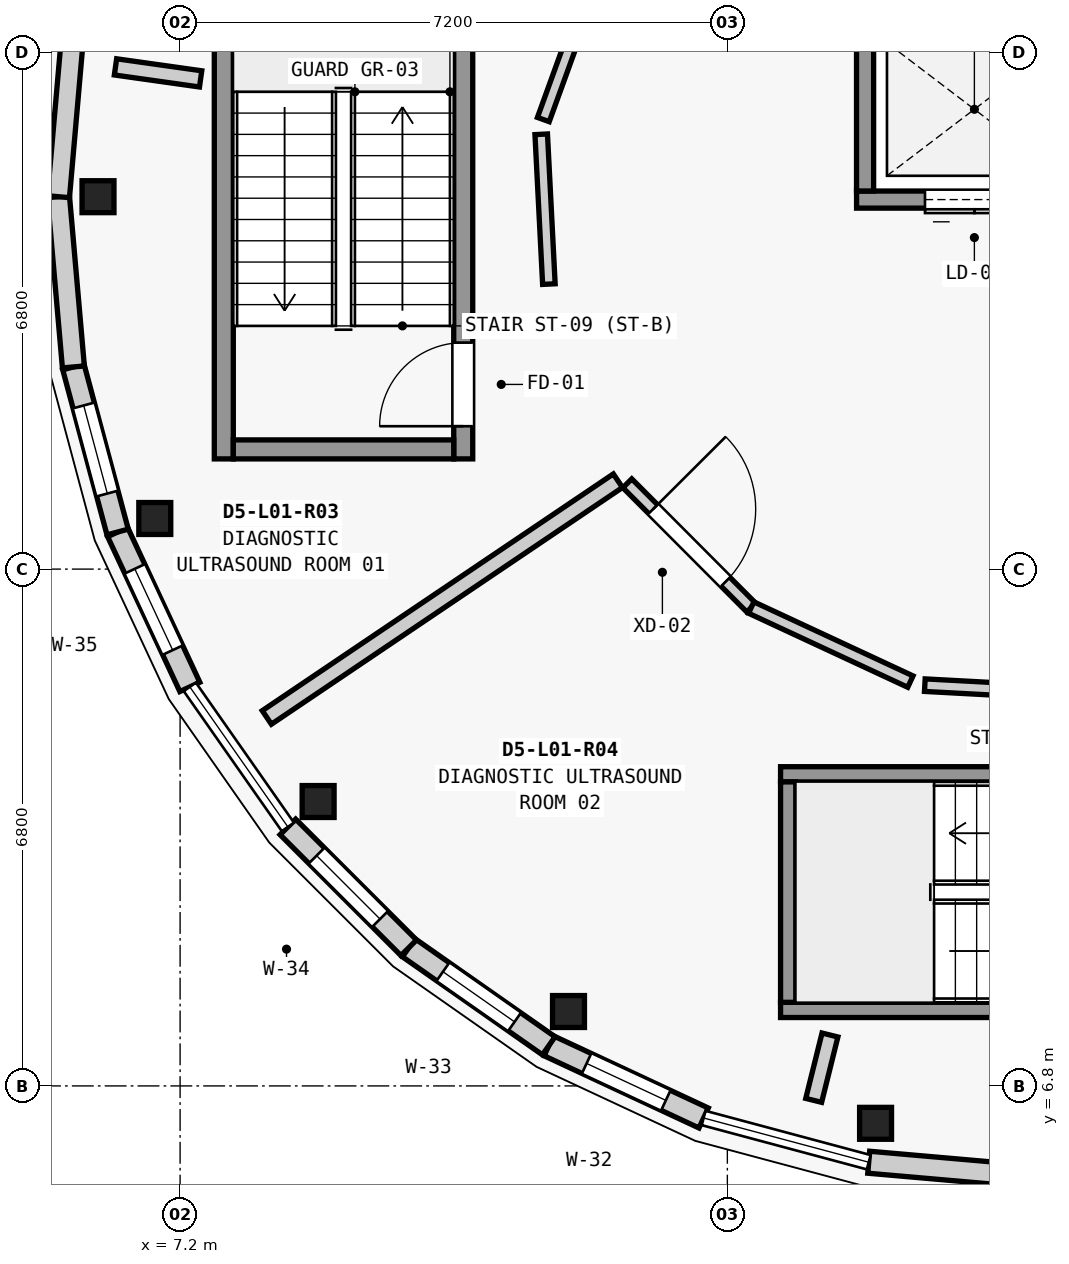
"""IFC4 building model, lengths in metres.
Left out: names, types, materials, properties, quantities, classifications, styles, units other than length and angle.
Written with IfcOpenShell. Run it as: python <this file> out.ifc"""

import sys

from ifc_helpers import new_model, si_unit, direction, frame, frame_2d, origin, origin_2d, place, context, subcontext, project, spatial, rectangle, extrude, element, fill, save


model = new_model("IFC4")
c1 = context("Model", 3, precision=1e-05, world=origin(), true_north=direction((0.0, 1.0)))
c2 = subcontext(c1, "Body", "Model", "MODEL_VIEW")
j1 = project(units=[si_unit("LENGTHUNIT", "METRE"), si_unit("PLANEANGLEUNIT", "RADIAN")], contexts=[c1])
p1 = place(None, origin())
s1 = spatial("IfcSite", under=j1, at=p1, CompositionType="ELEMENT")
p2 = place(p1, origin())
s2 = spatial("IfcBuilding", under=s1, at=p2, CompositionType="ELEMENT")
p3 = place(p2, frame((0.0, 0.0, 4.55)))
s3 = spatial("IfcBuildingStorey", under=s2, at=p3, CompositionType="ELEMENT", Elevation=4.55)
for number, where, z_axis, x_axis in (
    (1, (6.12, 18.5, 0.0), (0.0, 0.0, 1.0), (1.0, 0.0, 0.0)),
    (2, (6.867, 14.266, 0.0), (0.0, 0.0, 1.0), (1.0, 0.0, 0.0)),
    (3, (9.016, 10.542, 0.0), (0.0, 0.0, 1.0), (1.0, 0.0, 0.0)),
    (4, (12.31, 7.779, 0.0), (0.0, 0.0, 1.0), (1.0, 0.0, 0.0)),
    (5, (16.35, 6.308, 0.0), (0.0, 0.0, 1.0), (1.0, 0.0, 0.0)),
):
    element("IfcColumn", number, at=place(p3, frame(where, z_axis=z_axis, x_axis=x_axis)), inside=s3, PredefinedType="COLUMN", context=c2, shape_type="SweptSolid", body=[
        extrude(rectangle(XDim=0.42, YDim=0.42, at=origin_2d()), origin(), (0.0, 0.0, 1.0), 4.2),
    ])
p4 = place(p3, frame((18.5, 5.6, 0.0), z_axis=(0.0, 0.0, 1.0), x_axis=(-0.996201374201, 0.087079400775, 0.0)))
e6 = element("IfcWall", 6, at=p4, inside=s3, PredefinedType="ELEMENTEDWALL", context=c2, shape_type="SweptSolid", body=[
    extrude(rectangle(XDim=2.249, YDim=0.29, at=frame_2d((1.124, 0.0))), origin(), (0.0, 0.0, 1.0), 3.309),
])
p5 = place(p3, frame((14.088, 6.378, 0.0), z_axis=(0.0, 0.0, 1.0), x_axis=(-0.906360600886, 0.422504983593, 0.0)))
e7 = element("IfcWall", 7, at=p5, inside=s3, PredefinedType="ELEMENTEDWALL", context=c2, shape_type="SweptSolid", body=[
    extrude(rectangle(XDim=2.248, YDim=0.29, at=frame_2d((1.124, 0.0))), origin(), (0.0, 0.0, 1.0), 3.309),
])
p6 = place(p5, frame((0.549, 0.0, 0.85)))
e8 = element("IfcOpeningElement", 8, at=p6, cuts=e7, PredefinedType="OPENING", context=c2, shape_type="SweptSolid", body=[
    extrude(rectangle(XDim=1.15, YDim=2.0, at=frame_2d((0.575, 1.0))), frame((0.0, 0.155, 0.0), z_axis=(0.0, -1.0, 0.0), x_axis=(1.0, 0.0, 0.0)), (0.0, 0.0, 1.0), 0.31),
])
p7 = place(p3, frame((12.05, 7.328, 0.0), z_axis=(0.0, 0.0, 1.0), x_axis=(-0.819104393925, 0.573644482107, 0.0)))
e9 = element("IfcWall", 9, at=p7, inside=s3, PredefinedType="ELEMENTEDWALL", context=c2, shape_type="SweptSolid", body=[
    extrude(rectangle(XDim=2.249, YDim=0.29, at=frame_2d((1.125, 0.0))), origin(), (0.0, 0.0, 1.0), 3.309),
])
p8 = place(p7, frame((0.549, 0.0, 0.85)))
e10 = element("IfcOpeningElement", 10, at=p8, cuts=e9, PredefinedType="OPENING", context=c2, shape_type="SweptSolid", body=[
    extrude(rectangle(XDim=1.15, YDim=2.25, at=frame_2d((0.575, 1.125))), frame((0.0, 0.155, 0.0), z_axis=(0.0, -1.0, 0.0), x_axis=(1.0, 0.0, 0.0)), (0.0, 0.0, 1.0), 0.31),
])
p9 = place(p3, frame((10.208, 8.618, 0.0), z_axis=(0.0, 0.0, 1.0), x_axis=(-0.707106781187, 0.707106781187, 0.0)))
e11 = element("IfcWall", 11, at=p9, inside=s3, PredefinedType="ELEMENTEDWALL", context=c2, shape_type="SweptSolid", body=[
    extrude(rectangle(XDim=2.249, YDim=0.29, at=frame_2d((1.125, 0.0))), origin(), (0.0, 0.0, 1.0), 3.309),
])
p10 = place(p9, frame((0.534, 0.0, 0.85)))
e12 = element("IfcOpeningElement", 12, at=p10, cuts=e11, PredefinedType="OPENING", context=c2, shape_type="SweptSolid", body=[
    extrude(rectangle(XDim=1.18, YDim=1.55, at=frame_2d((0.59, 0.775))), frame((0.0, 0.155, 0.0), z_axis=(0.0, -1.0, 0.0), x_axis=(1.0, 0.0, 0.0)), (0.0, 0.0, 1.0), 0.31),
])
p11 = place(p3, frame((7.328, 12.05, 0.0), z_axis=(0.0, 0.0, 1.0), x_axis=(-0.422504983593, 0.906360600886, 0.0)))
e13 = element("IfcWall", 13, at=p11, inside=s3, PredefinedType="ELEMENTEDWALL", context=c2, shape_type="SweptSolid", body=[
    extrude(rectangle(XDim=2.248, YDim=0.29, at=frame_2d((1.124, 0.0))), origin(), (0.0, 0.0, 1.0), 3.309),
])
p12 = place(p11, frame((0.534, 0.0, 0.85)))
e14 = element("IfcOpeningElement", 14, at=p12, cuts=e13, PredefinedType="OPENING", context=c2, shape_type="SweptSolid", body=[
    extrude(rectangle(XDim=1.18, YDim=1.85, at=frame_2d((0.59, 0.925))), frame((0.0, 0.155, 0.0), z_axis=(0.0, -1.0, 0.0), x_axis=(1.0, 0.0, 0.0)), (0.0, 0.0, 1.0), 0.31),
])
p13 = place(p3, frame((6.378, 14.088, 0.0), z_axis=(0.0, 0.0, 1.0), x_axis=(-0.258824721145, 0.96592430538, 0.0)))
e15 = element("IfcWall", 15, at=p13, inside=s3, PredefinedType="ELEMENTEDWALL", context=c2, shape_type="SweptSolid", body=[
    extrude(rectangle(XDim=2.249, YDim=0.29, at=frame_2d((1.125, 0.0))), origin(), (0.0, 0.0, 1.0), 3.309),
])
p14 = place(p13, frame((0.524, 0.0, 0.85)))
e16 = element("IfcOpeningElement", 16, at=p14, cuts=e15, PredefinedType="OPENING", context=c2, shape_type="SweptSolid", body=[
    extrude(rectangle(XDim=1.2, YDim=1.35, at=frame_2d((0.6, 0.675))), frame((0.0, 0.155, 0.0), z_axis=(0.0, -1.0, 0.0), x_axis=(1.0, 0.0, 0.0)), (0.0, 0.0, 1.0), 0.31),
])
for number, where, z_axis, x_axis in (
    (17, (5.796, 16.26, 0.0), (0.0, 0.0, 1.0), (-0.087, 0.996, 0.0)),
    (18, (5.6, 18.5, 0.0), (0.0, 0.0, 1.0), (0.087, 0.996, 0.0)),
):
    element("IfcWall", number, at=place(p3, frame(where, z_axis=z_axis, x_axis=x_axis)), inside=s3, PredefinedType="ELEMENTEDWALL", context=c2, shape_type="SweptSolid", body=[
        extrude(rectangle(XDim=2.249, YDim=0.29, at=frame_2d((1.124, 0.0))), origin(), (0.0, 0.0, 1.0), 3.309),
    ])
p15 = place(p3, frame((10.925, 15.05, 0.0), z_axis=(0.0, 0.0, 1.0), x_axis=(0.0, 1.0, 0.0)))
e19 = element("IfcWall", 19, at=p15, inside=s3, PredefinedType="SHEAR", context=c2, shape_type="SweptSolid", body=[
    extrude(rectangle(XDim=6.9, YDim=0.25, at=frame_2d((3.45, 0.0))), origin(), (0.0, 0.0, 1.0), 3.955),
])
p16 = place(p15, frame((0.43, 0.0, 0.0)))
e20 = element("IfcOpeningElement", 20, at=p16, cuts=e19, PredefinedType="OPENING", context=c2, shape_type="SweptSolid", body=[
    extrude(rectangle(XDim=1.1, YDim=2.15, at=frame_2d((0.55, 1.075))), frame((0.0, 0.135, 0.0), z_axis=(0.0, -1.0, 0.0), x_axis=(1.0, 0.0, 0.0)), (0.0, 0.0, 1.0), 0.27),
])
p17 = place(p3, frame((7.775, 15.05, 0.0), z_axis=(0.0, 0.0, 1.0), x_axis=(0.0, 1.0, 0.0)))
e21 = element("IfcWall", 21, at=p17, inside=s3, PredefinedType="SHEAR", context=c2, shape_type="SweptSolid", body=[
    extrude(rectangle(XDim=6.9, YDim=0.25, at=frame_2d((3.45, 0.0))), origin(), (0.0, 0.0, 1.0), 3.955),
])
p18 = place(p3, frame((10.8, 15.175, 0.0), z_axis=(0.0, 0.0, 1.0), x_axis=(-1.0, 0.0, 0.0)))
e22 = element("IfcWall", 22, at=p18, inside=s3, PredefinedType="SHEAR", context=c2, shape_type="SweptSolid", body=[
    extrude(rectangle(XDim=2.9, YDim=0.25, at=frame_2d((1.45, 0.0))), origin(), (0.0, 0.0, 1.0), 3.955),
])
p19 = place(p3, frame((21.9, 10.9, 0.0), z_axis=(0.0, 0.0, 1.0), x_axis=(-1.0, 0.0, 0.0)))
e23 = element("IfcWall", 23, at=p19, inside=s3, PredefinedType="SHEAR", context=c2, shape_type="SweptSolid", body=[
    extrude(rectangle(XDim=6.8, YDim=0.2, at=frame_2d((3.4, 0.0))), origin(), (0.0, 0.0, 1.0), 3.955),
])
p20 = place(p19, frame((0.38, 0.0, 0.0)))
e24 = element("IfcOpeningElement", 24, at=p20, cuts=e23, PredefinedType="OPENING", context=c2, shape_type="SweptSolid", body=[
    extrude(rectangle(XDim=1.05, YDim=2.15, at=frame_2d((0.525, 1.075))), frame((0.0, 0.11, 0.0), z_axis=(0.0, -1.0, 0.0), x_axis=(1.0, 0.0, 0.0)), (0.0, 0.0, 1.0), 0.22),
])
p21 = place(p3, frame((21.9, 7.8, 0.0), z_axis=(0.0, 0.0, 1.0), x_axis=(-1.0, 0.0, 0.0)))
e25 = element("IfcWall", 25, at=p21, inside=s3, PredefinedType="SHEAR", context=c2, shape_type="SweptSolid", body=[
    extrude(rectangle(XDim=6.8, YDim=0.2, at=frame_2d((3.4, 0.0))), origin(), (0.0, 0.0, 1.0), 3.955),
])
p22 = place(p3, frame((15.2, 10.8, 0.0), z_axis=(0.0, 0.0, 1.0), x_axis=(0.0, -1.0, 0.0)))
e26 = element("IfcWall", 26, at=p22, inside=s3, PredefinedType="SHEAR", context=c2, shape_type="SweptSolid", body=[
    extrude(rectangle(XDim=2.9, YDim=0.2, at=frame_2d((1.45, 0.0))), origin(), (0.0, 0.0, 1.0), 3.955),
])
p23 = place(p3, frame((16.1, 18.462, 0.0), z_axis=(0.0, 0.0, 1.0), x_axis=(1.0, 0.0, 0.0)))
e27 = element("IfcWall", 27, at=p23, inside=s3, PredefinedType="SHEAR", context=c2, shape_type="SweptSolid", body=[
    extrude(rectangle(XDim=3.1, YDim=0.225, at=frame_2d((1.55, 0.0))), origin(), (0.0, 0.0, 1.0), 3.955),
])
p24 = place(p23, frame((0.9, 0.0, 0.0)))
e28 = element("IfcOpeningElement", 28, at=p24, cuts=e27, PredefinedType="OPENING", context=c2, shape_type="SweptSolid", body=[
    extrude(rectangle(XDim=1.3, YDim=2.2, at=frame_2d((0.65, 1.1))), frame((0.0, 0.123, 0.0), z_axis=(0.0, -1.0, 0.0), x_axis=(1.0, 0.0, 0.0)), (0.0, 0.0, 1.0), 0.245),
])
p25 = place(p3, frame((16.212, 18.575, 0.0), z_axis=(0.0, 0.0, 1.0), x_axis=(0.0, 1.0, 0.0)))
e29 = element("IfcWall", 29, at=p25, inside=s3, PredefinedType="SHEAR", context=c2, shape_type="SweptSolid", body=[
    extrude(rectangle(XDim=2.15, YDim=0.225, at=frame_2d((1.075, 0.0))), origin(), (0.0, 0.0, 1.0), 3.955),
])
p26 = place(p3, frame((7.47, 20.05, 0.0), z_axis=(0.0, 0.0, 1.0), x_axis=(-0.990198351661, 0.139668265429, 0.0)))
e30 = element("IfcWall", 30, at=p26, inside=s3, PredefinedType="SOLIDWALL", context=c2, shape_type="SweptSolid", body=[
    extrude(rectangle(XDim=1.131, YDim=0.215, at=frame_2d((0.565, 0.0))), origin(), (0.0, 0.0, 1.0), 3.284),
])
p27 = place(p3, frame((12.96, 14.763, 0.0), z_axis=(0.0, 0.0, 1.0), x_axis=(-0.829078742877, -0.559131861111, 0.0)))
e31 = element("IfcWall", 31, at=p27, inside=s3, PredefinedType="SOLIDWALL", context=c2, shape_type="SweptSolid", body=[
    extrude(rectangle(XDim=5.571, YDim=0.215, at=frame_2d((2.786, 0.0))), origin(), (0.0, 0.0, 1.0), 3.284),
])
p28 = place(p3, frame((15.75, 7.47, 0.0), z_axis=(0.0, 0.0, 1.0), x_axis=(-0.241627935272, -0.970368971524, 0.0)))
e32 = element("IfcWall", 32, at=p28, inside=s3, PredefinedType="SOLIDWALL", context=c2, shape_type="SweptSolid", body=[
    extrude(rectangle(XDim=0.886, YDim=0.215, at=frame_2d((0.443, 0.0))), origin(), (0.0, 0.0, 1.0), 3.284),
])
p29 = place(p3, frame((12.843, 21.899, 0.0), z_axis=(0.0, 0.0, 1.0), x_axis=(-0.34073018183, -0.940161126185, 0.0)))
e33 = element("IfcWall", 33, at=p29, inside=s3, PredefinedType="PARTITIONING", context=c2, shape_type="SweptSolid", body=[
    extrude(rectangle(XDim=2.536, YDim=0.165, at=frame_2d((1.268, 0.0))), origin(), (0.0, 0.0, 1.0), 3.284),
])
p30 = place(p3, frame((11.951, 19.321, 0.0), z_axis=(0.0, 0.0, 1.0), x_axis=(0.051214751973, -0.998687663477, 0.0)))
e34 = element("IfcWall", 34, at=p30, inside=s3, PredefinedType="PARTITIONING", context=c2, shape_type="SweptSolid", body=[
    extrude(rectangle(XDim=1.974, YDim=0.165, at=frame_2d((0.987, 0.0))), origin(), (0.0, 0.0, 1.0), 3.284),
])
p31 = place(p3, frame((13.084, 14.729, 0.0), z_axis=(0.0, 0.0, 1.0), x_axis=(0.70604855671, -0.708163424336, 0.0)))
e35 = element("IfcWall", 35, at=p31, inside=s3, PredefinedType="PARTITIONING", context=c2, shape_type="SweptSolid", body=[
    extrude(rectangle(XDim=2.309, YDim=0.165, at=frame_2d((1.154, 0.0))), origin(), (0.0, 0.0, 1.0), 3.284),
])
p32 = place(p31, frame((0.48, 0.0, 0.0)))
e36 = element("IfcOpeningElement", 36, at=p32, cuts=e35, PredefinedType="OPENING", context=c2, shape_type="SweptSolid", body=[
    extrude(rectangle(XDim=1.35, YDim=2.22, at=frame_2d((0.675, 1.11))), frame((0.0, 0.093, 0.0), z_axis=(0.0, -1.0, 0.0), x_axis=(1.0, 0.0, 0.0)), (0.0, 0.0, 1.0), 0.185),
])
for number, where, z_axis, x_axis in (
    (37, (14.714, 13.094, 0.0), (0.0, 0.0, 1.0), (0.907, -0.422, 0.0)),
    (38, (16.998, 12.073, 0.0), (0.0, 0.0, 1.0), (0.999, -0.054, 0.0)),
):
    element("IfcWall", number, at=place(p3, frame(where, z_axis=z_axis, x_axis=x_axis)), inside=s3, PredefinedType="PARTITIONING", context=c2, shape_type="SweptSolid", body=[
        extrude(rectangle(XDim=2.309, YDim=0.165, at=frame_2d((1.155, 0.0))), origin(), (0.0, 0.0, 1.0), 3.284),
    ])
p33 = place(p6, origin())
e39 = element("IfcWindow", 39, at=p33, inside=s3, PartitioningType="SINGLE_PANEL", PredefinedType="WINDOW", context=c2, shape_type="SweptSolid", body=[
    extrude(rectangle(XDim=1.15, YDim=2.0, at=frame_2d((0.575, 1.0))), frame((0.0, 0.03, 0.0), z_axis=(0.0, -1.0, 0.0), x_axis=(1.0, 0.0, 0.0)), (0.0, 0.0, 1.0), 0.06),
])
fill(e8, e39)
p34 = place(p8, origin())
e40 = element("IfcWindow", 40, at=p34, inside=s3, PartitioningType="SINGLE_PANEL", PredefinedType="WINDOW", context=c2, shape_type="SweptSolid", body=[
    extrude(rectangle(XDim=1.15, YDim=2.25, at=frame_2d((0.575, 1.125))), frame((0.0, 0.03, 0.0), z_axis=(0.0, -1.0, 0.0), x_axis=(1.0, 0.0, 0.0)), (0.0, 0.0, 1.0), 0.06),
])
fill(e10, e40)
p35 = place(p10, origin())
e41 = element("IfcWindow", 41, at=p35, inside=s3, PartitioningType="SINGLE_PANEL", PredefinedType="WINDOW", context=c2, shape_type="SweptSolid", body=[
    extrude(rectangle(XDim=1.18, YDim=1.55, at=frame_2d((0.59, 0.775))), frame((0.0, 0.03, 0.0), z_axis=(0.0, -1.0, 0.0), x_axis=(1.0, 0.0, 0.0)), (0.0, 0.0, 1.0), 0.06),
])
fill(e12, e41)
p36 = place(p12, origin())
e42 = element("IfcWindow", 42, at=p36, inside=s3, PartitioningType="SINGLE_PANEL", PredefinedType="WINDOW", context=c2, shape_type="SweptSolid", body=[
    extrude(rectangle(XDim=1.18, YDim=1.85, at=frame_2d((0.59, 0.925))), frame((0.0, 0.03, 0.0), z_axis=(0.0, -1.0, 0.0), x_axis=(1.0, 0.0, 0.0)), (0.0, 0.0, 1.0), 0.06),
])
fill(e14, e42)
p37 = place(p14, origin())
e43 = element("IfcWindow", 43, at=p37, inside=s3, PartitioningType="SINGLE_PANEL", PredefinedType="WINDOW", context=c2, shape_type="SweptSolid", body=[
    extrude(rectangle(XDim=1.2, YDim=1.35, at=frame_2d((0.6, 0.675))), frame((0.0, 0.03, 0.0), z_axis=(0.0, -1.0, 0.0), x_axis=(1.0, 0.0, 0.0)), (0.0, 0.0, 1.0), 0.06),
])
fill(e16, e43)
p38 = place(p16, origin())
e44 = element("IfcDoor", 44, at=p38, inside=s3, OperationType="SINGLE_SWING_LEFT", PredefinedType="DOOR", context=c2, shape_type="SweptSolid", body=[
    extrude(rectangle(XDim=1.1, YDim=2.15, at=frame_2d((0.55, 1.075))), frame((0.0, 0.025, 0.0), z_axis=(0.0, -1.0, 0.0), x_axis=(1.0, 0.0, 0.0)), (0.0, 0.0, 1.0), 0.05),
])
fill(e20, e44)
p39 = place(p24, origin())
e45 = element("IfcDoor", 45, at=p39, inside=s3, OperationType="DOUBLE_DOOR_SLIDING", PredefinedType="DOOR", context=c2, shape_type="SweptSolid", body=[
    extrude(rectangle(XDim=1.3, YDim=2.2, at=frame_2d((0.65, 1.1))), frame((0.0, 0.025, 0.0), z_axis=(0.0, -1.0, 0.0), x_axis=(1.0, 0.0, 0.0)), (0.0, 0.0, 1.0), 0.05),
])
fill(e28, e45)
p40 = place(p32, origin())
e46 = element("IfcDoor", 46, at=p40, inside=s3, OperationType="SINGLE_SWING_LEFT", PredefinedType="DOOR", context=c2, shape_type="SweptSolid", body=[
    extrude(rectangle(XDim=1.35, YDim=2.22, at=frame_2d((0.675, 1.11))), frame((0.0, 0.025, 0.0), z_axis=(0.0, -1.0, 0.0), x_axis=(1.0, 0.0, 0.0)), (0.0, 0.0, 1.0), 0.05),
])
fill(e36, e46)
save(model, sys.argv[1])
